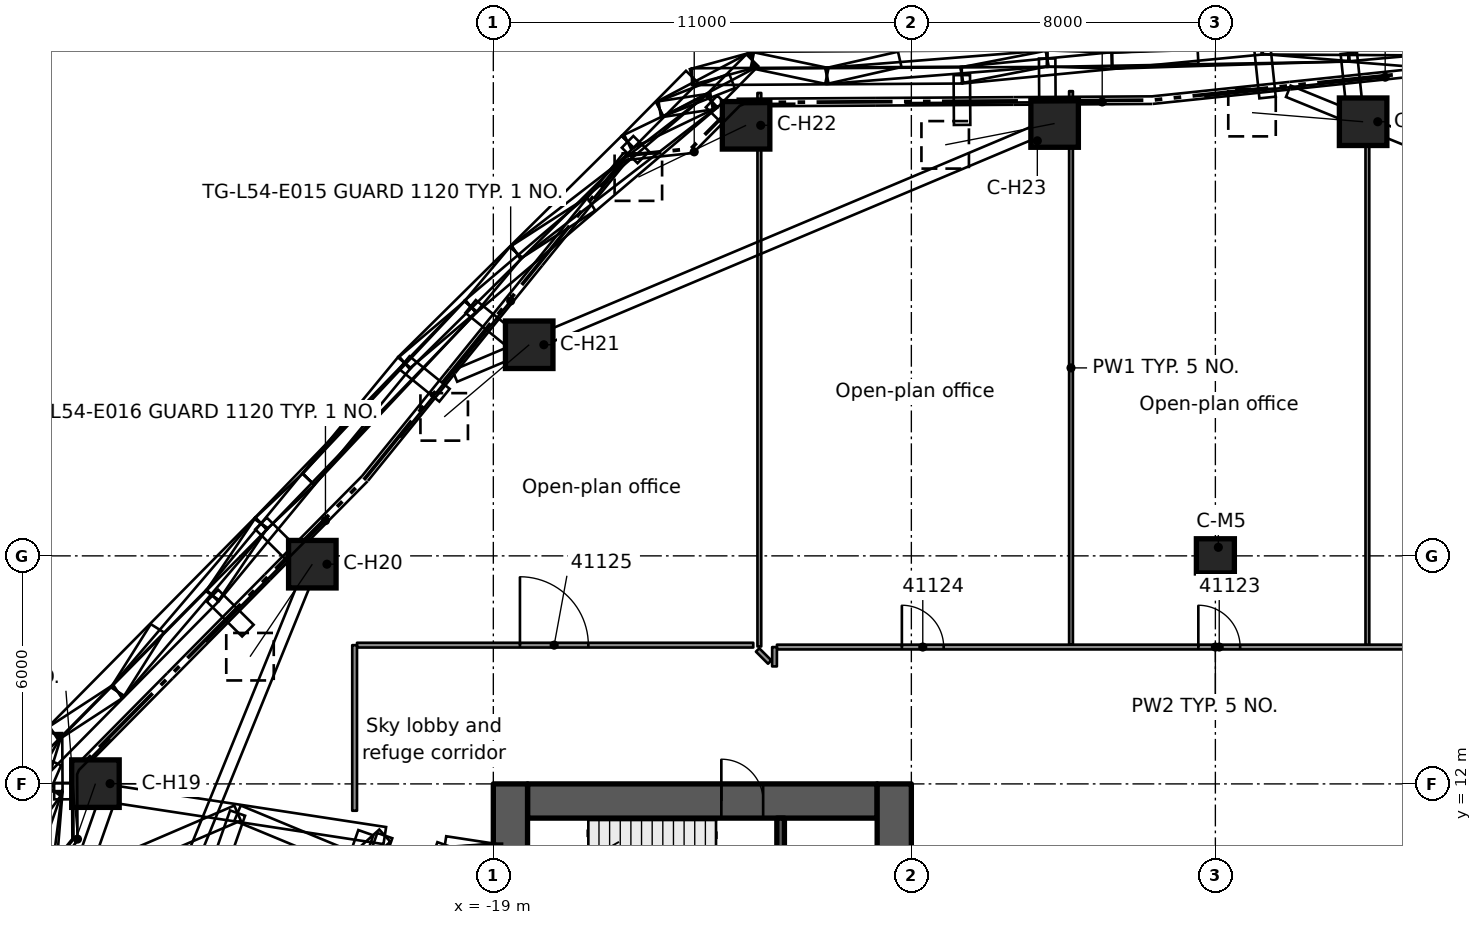
"""IFC4 building model, lengths in metres.
Left out: names, types, materials, properties, quantities, classifications, styles, units other than length and angle.
Written with IfcOpenShell. Run it as: python <this file> out.ifc"""

import sys

from ifc_helpers import new_model, si_unit, direction, frame, frame_2d, origin, origin_2d, place, context, subcontext, project, spatial, rectangle, extrude, element, fill, save


model = new_model("IFC4")
c1 = context("Model", 3, precision=1e-05, world=origin(), true_north=direction((0.0, 1.0)))
c2 = subcontext(c1, "Body", "Model", "MODEL_VIEW")
j1 = project(units=[si_unit("LENGTHUNIT", "METRE"), si_unit("PLANEANGLEUNIT", "RADIAN")], contexts=[c1])
p1 = place(None, origin())
s1 = spatial("IfcSite", under=j1, at=p1, CompositionType="ELEMENT")
p2 = place(p1, origin())
s2 = spatial("IfcBuilding", under=s1, at=p2, CompositionType="ELEMENT")
p3 = place(p2, frame((0.0, 0.0, 206.1)))
s3 = spatial("IfcBuildingStorey", under=s2, at=p3, CompositionType="ELEMENT", Elevation=206.1)
p4 = place(p3, frame((-18.1, 11.55, 0.0), z_axis=(0.0, 0.0, 1.0), x_axis=(1.0, 0.0, 0.0)))
e1 = element("IfcWall", 1, at=p4, inside=s3, PredefinedType="SHEAR", context=c2, shape_type="SweptSolid", body=[
    extrude(rectangle(XDim=9.2, YDim=0.9, at=frame_2d((4.6, 0.0))), origin(), (0.0, 0.0, 1.0), 4.4),
])
p5 = place(p4, frame((5.1, 0.0, 0.0)))
e2 = element("IfcOpeningElement", 2, at=p5, cuts=e1, PredefinedType="OPENING", context=c2, shape_type="SweptSolid", body=[
    extrude(rectangle(XDim=1.1, YDim=2.1, at=frame_2d((0.55, 1.05))), frame((0.0, 0.46, 0.0), z_axis=(0.0, -1.0, 0.0), x_axis=(1.0, 0.0, 0.0)), (0.0, 0.0, 1.0), 0.92),
])
p6 = place(p3, frame((-18.55, -12.0, 0.0), z_axis=(0.0, 0.0, 1.0), x_axis=(0.0, 1.0, 0.0)))
e3 = element("IfcWall", 3, at=p6, inside=s3, PredefinedType="SHEAR", context=c2, shape_type="SweptSolid", body=[
    extrude(rectangle(XDim=24.0, YDim=0.9, at=frame_2d((12.0, 0.0))), origin(), (0.0, 0.0, 1.0), 4.4),
])
p7 = place(p6, frame((5.9, 0.0, 0.0)))
e4 = element("IfcOpeningElement", 4, at=p7, cuts=e3, PredefinedType="OPENING", context=c2, shape_type="SweptSolid", body=[
    extrude(rectangle(XDim=1.8, YDim=2.1, at=frame_2d((0.9, 1.05))), frame((0.0, 0.46, 0.0), z_axis=(0.0, -1.0, 0.0), x_axis=(1.0, 0.0, 0.0)), (0.0, 0.0, 1.0), 0.92),
])
p8 = place(p6, frame((10.1, 0.0, 0.0)))
e5 = element("IfcOpeningElement", 5, at=p8, cuts=e3, PredefinedType="OPENING", context=c2, shape_type="SweptSolid", body=[
    extrude(rectangle(XDim=1.8, YDim=2.1, at=frame_2d((0.9, 1.05))), frame((0.0, 0.46, 0.0), z_axis=(0.0, -1.0, 0.0), x_axis=(1.0, 0.0, 0.0)), (0.0, 0.0, 1.0), 0.92),
])
p9 = place(p6, frame((14.3, 0.0, 0.0)))
e6 = element("IfcOpeningElement", 6, at=p9, cuts=e3, PredefinedType="OPENING", context=c2, shape_type="SweptSolid", body=[
    extrude(rectangle(XDim=1.8, YDim=2.1, at=frame_2d((0.9, 1.05))), frame((0.0, 0.46, 0.0), z_axis=(0.0, -1.0, 0.0), x_axis=(1.0, 0.0, 0.0)), (0.0, 0.0, 1.0), 0.92),
])
p10 = place(p3, frame((-8.45, -12.0, 0.0), z_axis=(0.0, 0.0, 1.0), x_axis=(0.0, 1.0, 0.0)))
e7 = element("IfcWall", 7, at=p10, inside=s3, PredefinedType="SHEAR", context=c2, shape_type="SweptSolid", body=[
    extrude(rectangle(XDim=24.0, YDim=0.9, at=frame_2d((12.0, 0.0))), origin(), (0.0, 0.0, 1.0), 4.4),
])
p11 = place(p10, frame((9.6, 0.0, 0.0)))
e8 = element("IfcOpeningElement", 8, at=p11, cuts=e7, PredefinedType="OPENING", context=c2, shape_type="SweptSolid", body=[
    extrude(rectangle(XDim=1.8, YDim=2.1, at=frame_2d((0.9, 1.05))), frame((0.0, 0.46, 0.0), z_axis=(0.0, -1.0, 0.0), x_axis=(1.0, 0.0, 0.0)), (0.0, 0.0, 1.0), 0.92),
])
p12 = place(p10, frame((5.9, 0.0, 0.0)))
e9 = element("IfcOpeningElement", 9, at=p12, cuts=e7, PredefinedType="OPENING", context=c2, shape_type="SweptSolid", body=[
    extrude(rectangle(XDim=1.8, YDim=2.1, at=frame_2d((0.9, 1.05))), frame((0.0, 0.46, 0.0), z_axis=(0.0, -1.0, 0.0), x_axis=(1.0, 0.0, 0.0)), (0.0, 0.0, 1.0), 0.92),
])
p13 = place(p10, frame((12.6, 0.0, 0.0)))
e10 = element("IfcOpeningElement", 10, at=p13, cuts=e7, PredefinedType="OPENING", context=c2, shape_type="SweptSolid", body=[
    extrude(rectangle(XDim=1.8, YDim=2.1, at=frame_2d((0.9, 1.05))), frame((0.0, 0.46, 0.0), z_axis=(0.0, -1.0, 0.0), x_axis=(1.0, 0.0, 0.0)), (0.0, 0.0, 1.0), 0.92),
])
p14 = place(p10, frame((19.65, 0.0, 0.0)))
e11 = element("IfcOpeningElement", 11, at=p14, cuts=e7, PredefinedType="OPENING", context=c2, shape_type="SweptSolid", body=[
    extrude(rectangle(XDim=1.1, YDim=2.1, at=frame_2d((0.55, 1.05))), frame((0.0, 0.46, 0.0), z_axis=(0.0, -1.0, 0.0), x_axis=(1.0, 0.0, 0.0)), (0.0, 0.0, 1.0), 0.92),
])
p15 = place(p3, frame((-29.47, 12.007, 0.413), z_axis=(-0.21882689292, -0.623513084536, 0.750563937548), x_axis=(0.943576164623, -0.331155585117, 0.0)))
e12 = element("IfcColumn", 12, at=p15, inside=s3, PredefinedType="COLUMN", context=c2, shape_type="SweptSolid", body=[
    extrude(rectangle(XDim=1.25, YDim=1.25, at=origin_2d()), origin(), (0.0, 0.0, 1.0), 4.762),
])
p16 = place(p3, frame((-23.763, 17.781, 0.394), z_axis=(-0.352426283358, -0.523026204983, 0.776040787394), x_axis=(0.829301622557, -0.558801233735, 0.0)))
e13 = element("IfcColumn", 13, at=p16, inside=s3, PredefinedType="COLUMN", context=c2, shape_type="SweptSolid", body=[
    extrude(rectangle(XDim=1.25, YDim=1.25, at=origin_2d()), origin(), (0.0, 0.0, 1.0), 4.654),
])
p17 = place(p3, frame((-18.056, 23.555, 0.394), z_axis=(-0.480742322781, -0.407867599836, 0.776228600408), x_axis=(0.646945190778, -0.762536504129, 0.0)))
e14 = element("IfcColumn", 14, at=p17, inside=s3, PredefinedType="COLUMN", context=c2, shape_type="SweptSolid", body=[
    extrude(rectangle(XDim=1.25, YDim=1.25, at=origin_2d()), origin(), (0.0, 0.0, 1.0), 4.653),
])
p18 = place(p3, frame((-12.349, 29.329, 0.413), z_axis=(-0.5954182598, -0.286274556016, 0.750682339258), x_axis=(0.433313832209, -0.901243098623, 0.0)))
e15 = element("IfcColumn", 15, at=p18, inside=s3, PredefinedType="COLUMN", context=c2, shape_type="SweptSolid", body=[
    extrude(rectangle(XDim=1.25, YDim=1.25, at=origin_2d()), origin(), (0.0, 0.0, 1.0), 4.761),
])
p19 = place(p3, frame((-4.23, 29.376, 0.394), z_axis=(-0.618915614767, -0.120561844769, 0.776149665582), x_axis=(0.191201472119, -0.981550812266, 0.0)))
e16 = element("IfcColumn", 16, at=p19, inside=s3, PredefinedType="COLUMN", context=c2, shape_type="SweptSolid", body=[
    extrude(rectangle(XDim=1.25, YDim=1.25, at=origin_2d()), origin(), (0.0, 0.0, 1.0), 4.654),
])
p20 = place(p3, frame((3.888, 29.423, 0.394), z_axis=(-0.628357788529, 0.051576127766, 0.776212852663), x_axis=(-0.081805717627, -0.99664829532, 0.0)))
e17 = element("IfcColumn", 17, at=p20, inside=s3, PredefinedType="COLUMN", context=c2, shape_type="SweptSolid", body=[
    extrude(rectangle(XDim=1.25, YDim=1.25, at=origin_2d()), origin(), (0.0, 0.0, 1.0), 4.653),
])
p21 = place(p3, frame((0.0, 18.0, 0.0), z_axis=(0.0, 0.0, 1.0), x_axis=(1.0, 0.0, 0.0)))
e18 = element("IfcColumn", 18, at=p21, inside=s3, PredefinedType="COLUMN", context=c2, shape_type="SweptSolid", body=[
    extrude(rectangle(XDim=1.0, YDim=0.9, at=origin_2d()), origin(), (0.0, 0.0, 1.0), 4.4),
])
p22 = place(p3, frame((-11.44, 6.975, 0.0), z_axis=(0.0, 0.0, 1.0), x_axis=(0.0, 1.0, 0.0)))
e19 = element("IfcWall", 19, at=p22, inside=s3, PredefinedType="SOLIDWALL", context=c2, shape_type="SweptSolid", body=[
    extrude(rectangle(XDim=4.125, YDim=0.2, at=frame_2d((2.062, 0.0))), origin(), (0.0, 0.0, 1.0), 3.99),
])
p23 = place(p22, frame((2.1, 0.0, 0.0)))
e20 = element("IfcOpeningElement", 20, at=p23, cuts=e19, PredefinedType="OPENING", context=c2, shape_type="SweptSolid", body=[
    extrude(rectangle(XDim=1.1, YDim=2.1, at=frame_2d((0.55, 1.05))), frame((0.0, 0.11, 0.0), z_axis=(0.0, -1.0, 0.0), x_axis=(1.0, 0.0, 0.0)), (0.0, 0.0, 1.0), 0.22),
])
p24 = place(p3, frame((-12.046, 15.524, 0.0), z_axis=(0.0, 0.0, 1.0), x_axis=(0.707106781187, -0.707106781187, 0.0)))
e21 = element("IfcWall", 21, at=p24, inside=s3, PredefinedType="PARTITIONING", context=c2, shape_type="SweptSolid", body=[
    extrude(rectangle(XDim=0.449, YDim=0.125, at=frame_2d((0.225, 0.0))), origin(), (0.0, 0.0, 1.0), 3.98),
])
p25 = place(p3, frame((-11.537, 15.601, 0.0), z_axis=(0.0, 0.0, 1.0), x_axis=(1.0, 0.0, 0.0)))
e22 = element("IfcWall", 22, at=p25, inside=s3, PredefinedType="PARTITIONING", context=c2, shape_type="SweptSolid", body=[
    extrude(rectangle(XDim=23.074, YDim=0.125, at=frame_2d((11.537, 0.0))), origin(), (0.0, 0.0, 1.0), 3.98),
])
p26 = place(p25, frame((18.387, 0.0, 0.0)))
e23 = element("IfcOpeningElement", 23, at=p26, cuts=e22, PredefinedType="OPENING", context=c2, shape_type="SweptSolid", body=[
    extrude(rectangle(XDim=1.8, YDim=2.1, at=frame_2d((0.9, 1.05))), frame((0.0, 0.073, 0.0), z_axis=(0.0, -1.0, 0.0), x_axis=(1.0, 0.0, 0.0)), (0.0, 0.0, 1.0), 0.145),
])
p27 = place(p25, frame((11.088, 0.0, 0.0)))
e24 = element("IfcOpeningElement", 24, at=p27, cuts=e22, PredefinedType="OPENING", context=c2, shape_type="SweptSolid", body=[
    extrude(rectangle(XDim=1.1, YDim=2.1, at=frame_2d((0.55, 1.05))), frame((0.0, 0.073, 0.0), z_axis=(0.0, -1.0, 0.0), x_axis=(1.0, 0.0, 0.0)), (0.0, 0.0, 1.0), 0.145),
])
p28 = place(p25, frame((3.288, 0.0, 0.0)))
e25 = element("IfcOpeningElement", 25, at=p28, cuts=e22, PredefinedType="OPENING", context=c2, shape_type="SweptSolid", body=[
    extrude(rectangle(XDim=1.1, YDim=2.1, at=frame_2d((0.55, 1.05))), frame((0.0, 0.073, 0.0), z_axis=(0.0, -1.0, 0.0), x_axis=(1.0, 0.0, 0.0)), (0.0, 0.0, 1.0), 0.145),
])
p29 = place(p3, frame((-22.587, 15.651, 0.0), z_axis=(0.0, 0.0, 1.0), x_axis=(1.0, 0.0, 0.0)))
e26 = element("IfcWall", 26, at=p29, inside=s3, PredefinedType="PARTITIONING", context=c2, shape_type="SweptSolid", body=[
    extrude(rectangle(XDim=10.427, YDim=0.125, at=frame_2d((5.213, 0.0))), origin(), (0.0, 0.0, 1.0), 3.98),
])
p30 = place(p29, frame((4.288, 0.0, 0.0)))
e27 = element("IfcOpeningElement", 27, at=p30, cuts=e26, PredefinedType="OPENING", context=c2, shape_type="SweptSolid", body=[
    extrude(rectangle(XDim=1.8, YDim=2.1, at=frame_2d((0.9, 1.05))), frame((0.0, 0.073, 0.0), z_axis=(0.0, -1.0, 0.0), x_axis=(1.0, 0.0, 0.0)), (0.0, 0.0, 1.0), 0.145),
])
p31 = place(p3, frame((-11.601, 15.092, 0.0), z_axis=(0.0, 0.0, 1.0), x_axis=(0.00192214926, 0.999998152669, 0.0)))
e28 = element("IfcWall", 28, at=p31, inside=s3, PredefinedType="PARTITIONING", context=c2, shape_type="SweptSolid", body=[
    extrude(rectangle(XDim=0.508, YDim=0.125, at=frame_2d((0.254, 0.0))), origin(), (0.0, 0.0, 1.0), 3.98),
])
p32 = place(p3, frame((4.0, 15.664, 0.0), z_axis=(0.0, 0.0, 1.0), x_axis=(0.0, 1.0, 0.0)))
e29 = element("IfcWall", 29, at=p32, inside=s3, PredefinedType="PARTITIONING", context=c2, shape_type="SweptSolid", body=[
    extrude(rectangle(XDim=13.944, YDim=0.1, at=frame_2d((6.972, 0.0))), origin(), (0.0, 0.0, 1.0), 3.98),
])
for number, where, z_axis, x_axis in (
    (30, (-3.799, 15.664, 0.0), (0.0, 0.0, 1.0), (0.0, 1.0, 0.0)),
    (31, (-12.0, 15.616, 0.0), (0.0, 0.0, 1.0), (0.0, 1.0, 0.0)),
):
    element("IfcWall", number, at=place(p3, frame(where, z_axis=z_axis, x_axis=x_axis)), inside=s3, PredefinedType="PARTITIONING", context=c2, shape_type="SweptSolid", body=[
        extrude(rectangle(XDim=14.564, YDim=0.1, at=frame_2d((7.282, 0.0))), origin(), (0.0, 0.0, 1.0), 3.98),
    ])
p33 = place(p3, frame((-22.65, 11.294, 0.0), z_axis=(0.0, 0.0, 1.0), x_axis=(0.0, 1.0, 0.0)))
e32 = element("IfcWall", 32, at=p33, inside=s3, PredefinedType="PARTITIONING", context=c2, shape_type="SweptSolid", body=[
    extrude(rectangle(XDim=4.357, YDim=0.125, at=frame_2d((2.178, 0.0))), origin(), (0.0, 0.0, 1.0), 3.98),
])
p34 = place(p5, origin())
e33 = element("IfcDoor", 33, at=p34, inside=s3, OperationType="SINGLE_SWING_RIGHT", PredefinedType="DOOR", context=c2, shape_type="SweptSolid", body=[
    extrude(rectangle(XDim=1.1, YDim=2.1, at=frame_2d((0.55, 1.05))), frame((0.0, 0.025, 0.0), z_axis=(0.0, -1.0, 0.0), x_axis=(1.0, 0.0, 0.0)), (0.0, 0.0, 1.0), 0.05),
])
fill(e2, e33)
p35 = place(p27, origin())
e34 = element("IfcDoor", 34, at=p35, inside=s3, OperationType="SINGLE_SWING_RIGHT", PredefinedType="DOOR", context=c2, shape_type="SweptSolid", body=[
    extrude(rectangle(XDim=1.1, YDim=2.1, at=frame_2d((0.55, 1.05))), frame((0.0, 0.025, 0.0), z_axis=(0.0, -1.0, 0.0), x_axis=(1.0, 0.0, 0.0)), (0.0, 0.0, 1.0), 0.05),
])
fill(e24, e34)
p36 = place(p28, origin())
e35 = element("IfcDoor", 35, at=p36, inside=s3, OperationType="SINGLE_SWING_LEFT", PredefinedType="DOOR", context=c2, shape_type="SweptSolid", body=[
    extrude(rectangle(XDim=1.1, YDim=2.1, at=frame_2d((0.55, 1.05))), frame((0.0, 0.025, 0.0), z_axis=(0.0, -1.0, 0.0), x_axis=(1.0, 0.0, 0.0)), (0.0, 0.0, 1.0), 0.05),
])
fill(e25, e35)
p37 = place(p30, origin())
e36 = element("IfcDoor", 36, at=p37, inside=s3, OperationType="DOUBLE_DOOR_SINGLE_SWING", PredefinedType="DOOR", context=c2, shape_type="SweptSolid", body=[
    extrude(rectangle(XDim=1.8, YDim=2.1, at=frame_2d((0.9, 1.05))), frame((0.0, 0.025, 0.0), z_axis=(0.0, -1.0, 0.0), x_axis=(1.0, 0.0, 0.0)), (0.0, 0.0, 1.0), 0.05),
])
fill(e27, e36)
save(model, sys.argv[1])
